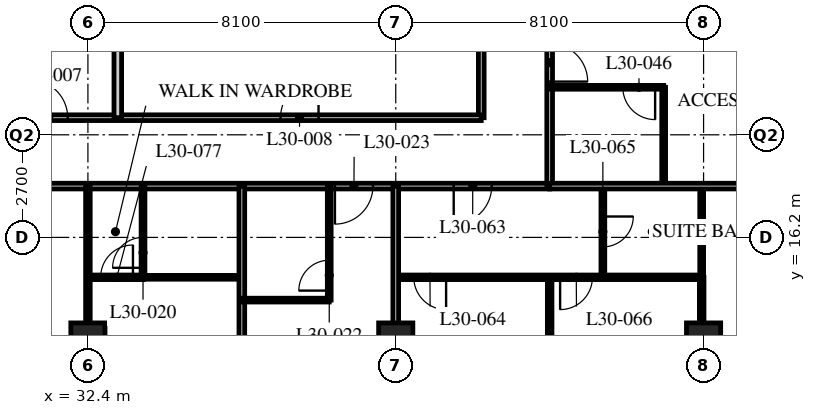
"""IFC4 building model, lengths in metres.
Left out: names, types, materials, properties, quantities, classifications, styles, units other than length and angle.
Written with IfcOpenShell. Run it as: python <this file> out.ifc"""

import sys

from ifc_helpers import new_model, si_unit, direction, frame, frame_2d, origin, origin_2d, place, context, subcontext, project, spatial, rectangle, hollow_rectangle, extrude, element, fill, save


model = new_model("IFC4")
c1 = context("Model", 3, precision=1e-05, world=origin(), true_north=direction((0.0, 1.0)))
c2 = subcontext(c1, "Body", "Model", "MODEL_VIEW")
j1 = project(units=[si_unit("LENGTHUNIT", "METRE"), si_unit("PLANEANGLEUNIT", "RADIAN")], contexts=[c1])
p1 = place(None, origin())
s1 = spatial("IfcSite", under=j1, at=p1, CompositionType="ELEMENT")
p2 = place(p1, origin())
s2 = spatial("IfcBuilding", under=s1, at=p2, CompositionType="ELEMENT")
p3 = place(p2, frame((0.0, 0.0, 120.4)))
s3 = spatial("IfcBuildingStorey", under=s2, at=p3, CompositionType="ELEMENT", Elevation=120.4)
for number, where, z_axis, x_axis in (
    (1, (32.4, 13.5, 0.0), (0.0, 0.0, 1.0), (1.0, 0.0, 0.0)),
    (2, (40.5, 13.5, 0.0), (0.0, 0.0, 1.0), (1.0, 0.0, 0.0)),
    (3, (48.6, 13.5, 0.0), (0.0, 0.0, 1.0), (1.0, 0.0, 0.0)),
):
    element("IfcColumn", number, at=place(p3, frame(where, z_axis=z_axis, x_axis=x_axis)), inside=s3, PredefinedType="COLUMN", context=c2, shape_type="SweptSolid", body=[
        extrude(hollow_rectangle(XDim=0.9, YDim=0.9, WallThickness=0.09, at=origin_2d()), origin(), (0.0, 0.0, 1.0), 3.4),
    ])
p4 = place(p3, frame((12.15, 17.55, 0.0), z_axis=(0.0, 0.0, 1.0), x_axis=(1.0, 0.0, 0.0)))
e4 = element("IfcWall", 4, at=p4, inside=s3, PredefinedType="PARTITIONING", context=c2, shape_type="SweptSolid", body=[
    extrude(rectangle(XDim=32.4, YDim=0.15, at=frame_2d((16.2, 0.0))), origin(), (0.0, 0.0, 1.0), 3.19),
])
p5 = place(p4, frame((5.95, 0.0, 0.0)))
e5 = element("IfcOpeningElement", 5, at=p5, cuts=e4, PredefinedType="OPENING", context=c2, shape_type="SweptSolid", body=[
    extrude(rectangle(XDim=1.0, YDim=2.1, at=frame_2d((0.5, 1.05))), frame((0.0, 0.085, 0.0), z_axis=(0.0, -1.0, 0.0), x_axis=(1.0, 0.0, 0.0)), (0.0, 0.0, 1.0), 0.17),
])
p6 = place(p4, frame((17.725, 0.0, 0.0)))
e6 = element("IfcOpeningElement", 6, at=p6, cuts=e4, PredefinedType="OPENING", context=c2, shape_type="SweptSolid", body=[
    extrude(rectangle(XDim=1.0, YDim=2.1, at=frame_2d((0.5, 1.05))), frame((0.0, 0.085, 0.0), z_axis=(0.0, -1.0, 0.0), x_axis=(1.0, 0.0, 0.0)), (0.0, 0.0, 1.0), 0.17),
])
p7 = place(p4, frame((26.75, 0.0, 0.0)))
e7 = element("IfcOpeningElement", 7, at=p7, cuts=e4, PredefinedType="OPENING", context=c2, shape_type="SweptSolid", body=[
    extrude(rectangle(XDim=1.0, YDim=2.1, at=frame_2d((0.5, 1.05))), frame((0.0, 0.085, 0.0), z_axis=(0.0, -1.0, 0.0), x_axis=(1.0, 0.0, 0.0)), (0.0, 0.0, 1.0), 0.17),
])
p8 = place(p4, frame((1.525, 0.0, 0.0)))
e8 = element("IfcOpeningElement", 8, at=p8, cuts=e4, PredefinedType="OPENING", context=c2, shape_type="SweptSolid", body=[
    extrude(rectangle(XDim=1.0, YDim=2.1, at=frame_2d((0.5, 1.05))), frame((0.0, 0.085, 0.0), z_axis=(0.0, -1.0, 0.0), x_axis=(1.0, 0.0, 0.0)), (0.0, 0.0, 1.0), 0.17),
])
p9 = place(p4, frame((29.875, 0.0, 0.0)))
e9 = element("IfcOpeningElement", 9, at=p9, cuts=e4, PredefinedType="OPENING", context=c2, shape_type="SweptSolid", body=[
    extrude(rectangle(XDim=1.0, YDim=2.1, at=frame_2d((0.5, 1.05))), frame((0.0, 0.085, 0.0), z_axis=(0.0, -1.0, 0.0), x_axis=(1.0, 0.0, 0.0)), (0.0, 0.0, 1.0), 0.17),
])
p10 = place(p3, frame((44.55, 17.55, 0.0), z_axis=(0.0, 0.0, 1.0), x_axis=(0.0, 1.0, 0.0)))
e10 = element("IfcWall", 10, at=p10, inside=s3, PredefinedType="PARTITIONING", context=c2, shape_type="SweptSolid", body=[
    extrude(rectangle(XDim=28.35, YDim=0.15, at=frame_2d((14.175, 0.0))), origin(), (0.0, 0.0, 1.0), 3.19),
])
p11 = place(p10, frame((2.75, 0.0, 0.0)))
e11 = element("IfcOpeningElement", 11, at=p11, cuts=e10, PredefinedType="OPENING", context=c2, shape_type="SweptSolid", body=[
    extrude(rectangle(XDim=1.0, YDim=2.1, at=frame_2d((0.5, 1.05))), frame((0.0, 0.085, 0.0), z_axis=(0.0, -1.0, 0.0), x_axis=(1.0, 0.0, 0.0)), (0.0, 0.0, 1.0), 0.17),
])
p12 = place(p10, frame((6.5, 0.0, 0.0)))
e12 = element("IfcOpeningElement", 12, at=p12, cuts=e10, PredefinedType="OPENING", context=c2, shape_type="SweptSolid", body=[
    extrude(rectangle(XDim=1.0, YDim=2.1, at=frame_2d((0.5, 1.05))), frame((0.0, 0.085, 0.0), z_axis=(0.0, -1.0, 0.0), x_axis=(1.0, 0.0, 0.0)), (0.0, 0.0, 1.0), 0.17),
])
p13 = place(p10, frame((10.0, 0.0, 0.0)))
e13 = element("IfcOpeningElement", 13, at=p13, cuts=e10, PredefinedType="OPENING", context=c2, shape_type="SweptSolid", body=[
    extrude(rectangle(XDim=1.0, YDim=2.1, at=frame_2d((0.5, 1.05))), frame((0.0, 0.085, 0.0), z_axis=(0.0, -1.0, 0.0), x_axis=(1.0, 0.0, 0.0)), (0.0, 0.0, 1.0), 0.17),
])
p14 = place(p10, frame((21.65, 0.0, 0.0)))
e14 = element("IfcOpeningElement", 14, at=p14, cuts=e10, PredefinedType="OPENING", context=c2, shape_type="SweptSolid", body=[
    extrude(rectangle(XDim=1.0, YDim=2.1, at=frame_2d((0.5, 1.05))), frame((0.0, 0.085, 0.0), z_axis=(0.0, -1.0, 0.0), x_axis=(1.0, 0.0, 0.0)), (0.0, 0.0, 1.0), 0.17),
])
p15 = place(p10, frame((26.75, 0.0, 0.0)))
e15 = element("IfcOpeningElement", 15, at=p15, cuts=e10, PredefinedType="OPENING", context=c2, shape_type="SweptSolid", body=[
    extrude(rectangle(XDim=1.0, YDim=2.1, at=frame_2d((0.5, 1.05))), frame((0.0, 0.085, 0.0), z_axis=(0.0, -1.0, 0.0), x_axis=(1.0, 0.0, 0.0)), (0.0, 0.0, 1.0), 0.17),
])
p16 = place(p3, frame((42.75, 19.35, 0.0), z_axis=(0.0, 0.0, 1.0), x_axis=(0.0, 1.0, 0.0)))
e16 = element("IfcWall", 16, at=p16, inside=s3, PredefinedType="PARTITIONING", context=c2, shape_type="SweptSolid", body=[
    extrude(rectangle(XDim=24.75, YDim=0.15, at=frame_2d((12.375, 0.0))), origin(), (0.0, 0.0, 1.0), 3.19),
])
p17 = place(p16, frame((8.5, 0.0, 0.0)))
e17 = element("IfcOpeningElement", 17, at=p17, cuts=e16, PredefinedType="OPENING", context=c2, shape_type="SweptSolid", body=[
    extrude(rectangle(XDim=1.0, YDim=2.1, at=frame_2d((0.5, 1.05))), frame((0.0, 0.085, 0.0), z_axis=(0.0, -1.0, 0.0), x_axis=(1.0, 0.0, 0.0)), (0.0, 0.0, 1.0), 0.17),
])
p18 = place(p16, frame((16.6, 0.0, 0.0)))
e18 = element("IfcOpeningElement", 18, at=p18, cuts=e16, PredefinedType="OPENING", context=c2, shape_type="SweptSolid", body=[
    extrude(rectangle(XDim=1.0, YDim=2.1, at=frame_2d((0.5, 1.05))), frame((0.0, 0.085, 0.0), z_axis=(0.0, -1.0, 0.0), x_axis=(1.0, 0.0, 0.0)), (0.0, 0.0, 1.0), 0.17),
])
p19 = place(p3, frame((29.56, 19.35, 0.0), z_axis=(0.0, 0.0, 1.0), x_axis=(1.0, 0.0, 0.0)))
e19 = element("IfcWall", 19, at=p19, inside=s3, PredefinedType="PARTITIONING", context=c2, shape_type="SweptSolid", body=[
    extrude(rectangle(XDim=13.19, YDim=0.15, at=frame_2d((6.595, 0.0))), origin(), (0.0, 0.0, 1.0), 3.19),
])
p20 = place(p19, frame((1.308, 0.0, 0.0)))
e20 = element("IfcOpeningElement", 20, at=p20, cuts=e19, PredefinedType="OPENING", context=c2, shape_type="SweptSolid", body=[
    extrude(rectangle(XDim=1.0, YDim=2.1, at=frame_2d((0.5, 1.05))), frame((0.0, 0.085, 0.0), z_axis=(0.0, -1.0, 0.0), x_axis=(1.0, 0.0, 0.0)), (0.0, 0.0, 1.0), 0.17),
])
p21 = place(p19, frame((7.908, 0.0, 0.0)))
e21 = element("IfcOpeningElement", 21, at=p21, cuts=e19, PredefinedType="OPENING", context=c2, shape_type="SweptSolid", body=[
    extrude(rectangle(XDim=1.0, YDim=2.1, at=frame_2d((0.5, 1.05))), frame((0.0, 0.085, 0.0), z_axis=(0.0, -1.0, 0.0), x_axis=(1.0, 0.0, 0.0)), (0.0, 0.0, 1.0), 0.17),
])
p22 = place(p3, frame((33.186, 19.35, 0.0), z_axis=(0.0, 0.0, 1.0), x_axis=(0.0, 1.0, 0.0)))
e22 = element("IfcWall", 22, at=p22, inside=s3, PredefinedType="SOLIDWALL", context=c2, shape_type="SweptSolid", body=[
    extrude(rectangle(XDim=4.95, YDim=0.2, at=frame_2d((2.475, 0.0))), origin(), (0.0, 0.0, 1.0), 3.19),
])
p23 = place(p3, frame((33.85, 15.15, 0.0), z_axis=(0.0, 0.0, 1.0), x_axis=(1.0, 0.0, 0.0)))
e23 = element("IfcWall", 23, at=p23, inside=s3, PredefinedType="PARTITIONING", context=c2, shape_type="SweptSolid", body=[
    extrude(rectangle(XDim=2.6, YDim=0.1, at=frame_2d((1.3, 0.0))), origin(), (0.0, 0.0, 1.0), 3.19),
])
p24 = place(p3, frame((33.85, 17.55, 0.0), z_axis=(0.0, 0.0, 1.0), x_axis=(0.0, -1.0, 0.0)))
e24 = element("IfcWall", 24, at=p24, inside=s3, PredefinedType="PARTITIONING", context=c2, shape_type="SweptSolid", body=[
    extrude(rectangle(XDim=2.4, YDim=0.1, at=frame_2d((1.2, 0.0))), origin(), (0.0, 0.0, 1.0), 3.19),
])
p25 = place(p24, frame((1.35, 0.0, 0.0)))
e25 = element("IfcOpeningElement", 25, at=p25, cuts=e24, PredefinedType="OPENING", context=c2, shape_type="SweptSolid", body=[
    extrude(rectangle(XDim=0.8, YDim=2.1, at=frame_2d((0.4, 1.05))), frame((0.0, 0.06, 0.0), z_axis=(0.0, -1.0, 0.0), x_axis=(1.0, 0.0, 0.0)), (0.0, 0.0, 1.0), 0.12),
])
p26 = place(p3, frame((32.4, 17.55, 0.0), z_axis=(0.0, 0.0, 1.0), x_axis=(0.0, -1.0, 0.0)))
e26 = element("IfcWall", 26, at=p26, inside=s3, PredefinedType="PARTITIONING", context=c2, shape_type="SweptSolid", body=[
    extrude(rectangle(XDim=11.85, YDim=0.12, at=frame_2d((5.925, 0.0))), origin(), (0.0, 0.0, 1.0), 2.578),
])
p27 = place(p26, frame((6.85, 0.0, 0.0)))
e27 = element("IfcOpeningElement", 27, at=p27, cuts=e26, PredefinedType="OPENING", context=c2, shape_type="SweptSolid", body=[
    extrude(rectangle(XDim=0.85, YDim=2.1, at=frame_2d((0.425, 1.05))), frame((0.0, 0.07, 0.0), z_axis=(0.0, -1.0, 0.0), x_axis=(1.0, 0.0, 0.0)), (0.0, 0.0, 1.0), 0.14),
])
p28 = place(p3, frame((36.45, 17.55, 0.0), z_axis=(0.0, 0.0, 1.0), x_axis=(0.0, -1.0, 0.0)))
e28 = element("IfcWall", 28, at=p28, inside=s3, PredefinedType="PARTITIONING", context=c2, shape_type="SweptSolid", body=[
    extrude(rectangle(XDim=11.85, YDim=0.15, at=frame_2d((5.925, 0.0))), origin(), (0.0, 0.0, 1.0), 3.19),
])
p29 = place(p3, frame((36.45, 14.55, 0.0), z_axis=(0.0, 0.0, 1.0), x_axis=(1.0, 0.0, 0.0)))
e29 = element("IfcWall", 29, at=p29, inside=s3, PredefinedType="PARTITIONING", context=c2, shape_type="SweptSolid", body=[
    extrude(rectangle(XDim=2.3, YDim=0.1, at=frame_2d((1.15, 0.0))), origin(), (0.0, 0.0, 1.0), 3.19),
])
p30 = place(p3, frame((38.75, 17.55, 0.0), z_axis=(0.0, 0.0, 1.0), x_axis=(0.0, -1.0, 0.0)))
e30 = element("IfcWall", 30, at=p30, inside=s3, PredefinedType="PARTITIONING", context=c2, shape_type="SweptSolid", body=[
    extrude(rectangle(XDim=3.0, YDim=0.1, at=frame_2d((1.5, 0.0))), origin(), (0.0, 0.0, 1.0), 3.19),
])
p31 = place(p30, frame((1.95, 0.0, 0.0)))
e31 = element("IfcOpeningElement", 31, at=p31, cuts=e30, PredefinedType="OPENING", context=c2, shape_type="SweptSolid", body=[
    extrude(rectangle(XDim=0.8, YDim=2.1, at=frame_2d((0.4, 1.05))), frame((0.0, 0.06, 0.0), z_axis=(0.0, -1.0, 0.0), x_axis=(1.0, 0.0, 0.0)), (0.0, 0.0, 1.0), 0.12),
])
p32 = place(p3, frame((47.55, 17.55, 0.0), z_axis=(0.0, 0.0, 1.0), x_axis=(0.0, 1.0, 0.0)))
e32 = element("IfcWall", 32, at=p32, inside=s3, PredefinedType="PARTITIONING", context=c2, shape_type="SweptSolid", body=[
    extrude(rectangle(XDim=2.6, YDim=0.1, at=frame_2d((1.3, 0.0))), origin(), (0.0, 0.0, 1.0), 3.19),
])
p33 = place(p3, frame((44.55, 20.15, 0.0), z_axis=(0.0, 0.0, 1.0), x_axis=(1.0, 0.0, 0.0)))
e33 = element("IfcWall", 33, at=p33, inside=s3, PredefinedType="PARTITIONING", context=c2, shape_type="SweptSolid", body=[
    extrude(rectangle(XDim=3.0, YDim=0.1, at=frame_2d((1.5, 0.0))), origin(), (0.0, 0.0, 1.0), 3.19),
])
p34 = place(p33, frame((1.925, 0.0, 0.0)))
e34 = element("IfcOpeningElement", 34, at=p34, cuts=e33, PredefinedType="OPENING", context=c2, shape_type="SweptSolid", body=[
    extrude(rectangle(XDim=0.85, YDim=2.1, at=frame_2d((0.425, 1.05))), frame((0.0, 0.06, 0.0), z_axis=(0.0, -1.0, 0.0), x_axis=(1.0, 0.0, 0.0)), (0.0, 0.0, 1.0), 0.12),
])
p35 = place(p3, frame((40.5, 15.15, 0.0), z_axis=(0.0, 0.0, 1.0), x_axis=(1.0, 0.0, 0.0)))
e35 = element("IfcWall", 35, at=p35, inside=s3, PredefinedType="PARTITIONING", context=c2, shape_type="SweptSolid", body=[
    extrude(rectangle(XDim=8.05, YDim=0.12, at=frame_2d((4.025, 0.0))), origin(), (0.0, 0.0, 1.0), 3.19),
])
p36 = place(p35, frame((0.475, 0.0, 0.0)))
e36 = element("IfcOpeningElement", 36, at=p36, cuts=e35, PredefinedType="OPENING", context=c2, shape_type="SweptSolid", body=[
    extrude(rectangle(XDim=0.85, YDim=2.1, at=frame_2d((0.425, 1.05))), frame((0.0, 0.07, 0.0), z_axis=(0.0, -1.0, 0.0), x_axis=(1.0, 0.0, 0.0)), (0.0, 0.0, 1.0), 0.14),
])
p37 = place(p35, frame((4.325, 0.0, 0.0)))
e37 = element("IfcOpeningElement", 37, at=p37, cuts=e35, PredefinedType="OPENING", context=c2, shape_type="SweptSolid", body=[
    extrude(rectangle(XDim=0.85, YDim=2.1, at=frame_2d((0.425, 1.05))), frame((0.0, 0.07, 0.0), z_axis=(0.0, -1.0, 0.0), x_axis=(1.0, 0.0, 0.0)), (0.0, 0.0, 1.0), 0.14),
])
p38 = place(p3, frame((45.95, 17.55, 0.0), z_axis=(0.0, 0.0, 1.0), x_axis=(0.0, -1.0, 0.0)))
e38 = element("IfcWall", 38, at=p38, inside=s3, PredefinedType="PARTITIONING", context=c2, shape_type="SweptSolid", body=[
    extrude(rectangle(XDim=2.4, YDim=0.1, at=frame_2d((1.2, 0.0))), origin(), (0.0, 0.0, 1.0), 3.19),
])
p39 = place(p38, frame((0.8, 0.0, 0.0)))
e39 = element("IfcOpeningElement", 39, at=p39, cuts=e38, PredefinedType="OPENING", context=c2, shape_type="SweptSolid", body=[
    extrude(rectangle(XDim=0.8, YDim=2.1, at=frame_2d((0.4, 1.05))), frame((0.0, 0.06, 0.0), z_axis=(0.0, -1.0, 0.0), x_axis=(1.0, 0.0, 0.0)), (0.0, 0.0, 1.0), 0.12),
])
p40 = place(p3, frame((48.55, 17.55, 0.0), z_axis=(0.0, 0.0, 1.0), x_axis=(0.0, -1.0, 0.0)))
e40 = element("IfcWall", 40, at=p40, inside=s3, PredefinedType="PARTITIONING", context=c2, shape_type="SweptSolid", body=[
    extrude(rectangle(XDim=2.4, YDim=0.1, at=frame_2d((1.2, 0.0))), origin(), (0.0, 0.0, 1.0), 2.578),
])
p41 = place(p3, frame((44.55, 15.15, 0.0), z_axis=(0.0, 0.0, 1.0), x_axis=(0.0, -1.0, 0.0)))
e41 = element("IfcWall", 41, at=p41, inside=s3, PredefinedType="PARTITIONING", context=c2, shape_type="SweptSolid", body=[
    extrude(rectangle(XDim=9.45, YDim=0.12, at=frame_2d((4.725, 0.0))), origin(), (0.0, 0.0, 1.0), 3.19),
])
p42 = place(p3, frame((44.55, 17.55, 0.0), z_axis=(0.0, 0.0, 1.0), x_axis=(1.0, 0.0, 0.0)))
e42 = element("IfcWall", 42, at=p42, inside=s3, PredefinedType="PARTITIONING", context=c2, shape_type="SweptSolid", body=[
    extrude(rectangle(XDim=11.85, YDim=0.15, at=frame_2d((5.925, 0.0))), origin(), (0.0, 0.0, 1.0), 3.19),
])
p43 = place(p3, frame((40.5, 17.55, 0.0), z_axis=(0.0, 0.0, 1.0), x_axis=(0.0, -1.0, 0.0)))
e43 = element("IfcWall", 43, at=p43, inside=s3, PredefinedType="PARTITIONING", context=c2, shape_type="SweptSolid", body=[
    extrude(rectangle(XDim=11.85, YDim=0.15, at=frame_2d((5.925, 0.0))), origin(), (0.0, 0.0, 1.0), 2.578),
])
p44 = place(p3, frame((33.86, 15.15, 0.0), z_axis=(0.0, 0.0, 1.0), x_axis=(-1.0, 0.0, 0.0)))
e44 = element("IfcWall", 44, at=p44, inside=s3, PredefinedType="PARTITIONING", context=c2, shape_type="SweptSolid", body=[
    extrude(rectangle(XDim=1.46, YDim=0.12, at=frame_2d((0.73, 0.0))), origin(), (0.0, 0.0, 1.0), 3.19),
])
p45 = place(p44, frame((0.275, 0.0, 0.0)))
e45 = element("IfcOpeningElement", 45, at=p45, cuts=e44, PredefinedType="OPENING", context=c2, shape_type="SweptSolid", body=[
    extrude(rectangle(XDim=0.85, YDim=2.1, at=frame_2d((0.425, 1.05))), frame((0.0, 0.07, 0.0), z_axis=(0.0, -1.0, 0.0), x_axis=(1.0, 0.0, 0.0)), (0.0, 0.0, 1.0), 0.14),
])
p46 = place(p3, frame((48.55, 15.15, 0.0), z_axis=(0.0, 0.0, 1.0), x_axis=(0.0, -1.0, 0.0)))
e46 = element("IfcWall", 46, at=p46, inside=s3, PredefinedType="PARTITIONING", context=c2, shape_type="SweptSolid", body=[
    extrude(rectangle(XDim=1.2, YDim=0.12, at=frame_2d((0.6, 0.0))), origin(), (0.0, 0.0, 1.0), 2.578),
])
p47 = place(p20, origin())
e47 = element("IfcDoor", 47, at=p47, inside=s3, OperationType="SINGLE_SWING_LEFT", PredefinedType="DOOR", context=c2, shape_type="SweptSolid", body=[
    extrude(rectangle(XDim=1.0, YDim=2.1, at=frame_2d((0.5, 1.05))), frame((0.0, 0.025, 0.0), z_axis=(0.0, -1.0, 0.0), x_axis=(1.0, 0.0, 0.0)), (0.0, 0.0, 1.0), 0.05),
])
fill(e20, e47)
p48 = place(p21, origin())
e48 = element("IfcDoor", 48, at=p48, inside=s3, OperationType="SINGLE_SWING_RIGHT", PredefinedType="DOOR", context=c2, shape_type="SweptSolid", body=[
    extrude(rectangle(XDim=1.0, YDim=2.1, at=frame_2d((0.5, 1.05))), frame((0.0, 0.025, 0.0), z_axis=(0.0, -1.0, 0.0), x_axis=(1.0, 0.0, 0.0)), (0.0, 0.0, 1.0), 0.05),
])
fill(e21, e48)
p49 = place(p25, origin())
e49 = element("IfcDoor", 49, at=p49, inside=s3, OperationType="SINGLE_SWING_LEFT", PredefinedType="DOOR", context=c2, shape_type="SweptSolid", body=[
    extrude(rectangle(XDim=0.8, YDim=2.1, at=frame_2d((0.4, 1.05))), frame((0.0, 0.025, 0.0), z_axis=(0.0, -1.0, 0.0), x_axis=(1.0, 0.0, 0.0)), (0.0, 0.0, 1.0), 0.05),
])
fill(e25, e49)
p50 = place(p31, origin())
e50 = element("IfcDoor", 50, at=p50, inside=s3, OperationType="SINGLE_SWING_LEFT", PredefinedType="DOOR", context=c2, shape_type="SweptSolid", body=[
    extrude(rectangle(XDim=0.8, YDim=2.1, at=frame_2d((0.4, 1.05))), frame((0.0, 0.025, 0.0), z_axis=(0.0, -1.0, 0.0), x_axis=(1.0, 0.0, 0.0)), (0.0, 0.0, 1.0), 0.05),
])
fill(e31, e50)
p51 = place(p7, origin())
e51 = element("IfcDoor", 51, at=p51, inside=s3, OperationType="SINGLE_SWING_RIGHT", PredefinedType="DOOR", context=c2, shape_type="SweptSolid", body=[
    extrude(rectangle(XDim=1.0, YDim=2.1, at=frame_2d((0.5, 1.05))), frame((0.0, 0.025, 0.0), z_axis=(0.0, -1.0, 0.0), x_axis=(1.0, 0.0, 0.0)), (0.0, 0.0, 1.0), 0.05),
])
fill(e7, e51)
p52 = place(p34, origin())
e52 = element("IfcDoor", 52, at=p52, inside=s3, OperationType="SINGLE_SWING_LEFT", PredefinedType="DOOR", context=c2, shape_type="SweptSolid", body=[
    extrude(rectangle(XDim=0.85, YDim=2.1, at=frame_2d((0.425, 1.05))), frame((0.0, 0.025, 0.0), z_axis=(0.0, -1.0, 0.0), x_axis=(1.0, 0.0, 0.0)), (0.0, 0.0, 1.0), 0.05),
])
fill(e34, e52)
p53 = place(p11, origin())
e53 = element("IfcDoor", 53, at=p53, inside=s3, OperationType="SINGLE_SWING_RIGHT", PredefinedType="DOOR", context=c2, shape_type="SweptSolid", body=[
    extrude(rectangle(XDim=1.0, YDim=2.1, at=frame_2d((0.5, 1.05))), frame((0.0, 0.025, 0.0), z_axis=(0.0, -1.0, 0.0), x_axis=(1.0, 0.0, 0.0)), (0.0, 0.0, 1.0), 0.05),
])
fill(e11, e53)
p54 = place(p9, origin())
e54 = element("IfcDoor", 54, at=p54, inside=s3, OperationType="SINGLE_SWING_RIGHT", PredefinedType="DOOR", context=c2, shape_type="SweptSolid", body=[
    extrude(rectangle(XDim=1.0, YDim=2.1, at=frame_2d((0.5, 1.05))), frame((0.0, 0.025, 0.0), z_axis=(0.0, -1.0, 0.0), x_axis=(1.0, 0.0, 0.0)), (0.0, 0.0, 1.0), 0.05),
])
fill(e9, e54)
p55 = place(p36, origin())
e55 = element("IfcDoor", 55, at=p55, inside=s3, OperationType="SINGLE_SWING_LEFT", PredefinedType="DOOR", context=c2, shape_type="SweptSolid", body=[
    extrude(rectangle(XDim=0.85, YDim=2.1, at=frame_2d((0.425, 1.05))), frame((0.0, 0.025, 0.0), z_axis=(0.0, -1.0, 0.0), x_axis=(1.0, 0.0, 0.0)), (0.0, 0.0, 1.0), 0.05),
])
fill(e36, e55)
p56 = place(p39, origin())
e56 = element("IfcDoor", 56, at=p56, inside=s3, OperationType="SINGLE_SWING_LEFT", PredefinedType="DOOR", context=c2, shape_type="SweptSolid", body=[
    extrude(rectangle(XDim=0.8, YDim=2.1, at=frame_2d((0.4, 1.05))), frame((0.0, 0.025, 0.0), z_axis=(0.0, -1.0, 0.0), x_axis=(1.0, 0.0, 0.0)), (0.0, 0.0, 1.0), 0.05),
])
fill(e39, e56)
p57 = place(p37, origin())
e57 = element("IfcDoor", 57, at=p57, inside=s3, OperationType="SINGLE_SWING_RIGHT", PredefinedType="DOOR", context=c2, shape_type="SweptSolid", body=[
    extrude(rectangle(XDim=0.85, YDim=2.1, at=frame_2d((0.425, 1.05))), frame((0.0, 0.025, 0.0), z_axis=(0.0, -1.0, 0.0), x_axis=(1.0, 0.0, 0.0)), (0.0, 0.0, 1.0), 0.05),
])
fill(e37, e57)
p58 = place(p45, origin())
e58 = element("IfcDoor", 58, at=p58, inside=s3, OperationType="SINGLE_SWING_RIGHT", PredefinedType="DOOR", context=c2, shape_type="SweptSolid", body=[
    extrude(rectangle(XDim=0.85, YDim=2.1, at=frame_2d((0.425, 1.05))), frame((0.0, 0.025, 0.0), z_axis=(0.0, -1.0, 0.0), x_axis=(1.0, 0.0, 0.0)), (0.0, 0.0, 1.0), 0.05),
])
fill(e45, e58)
save(model, sys.argv[1])
